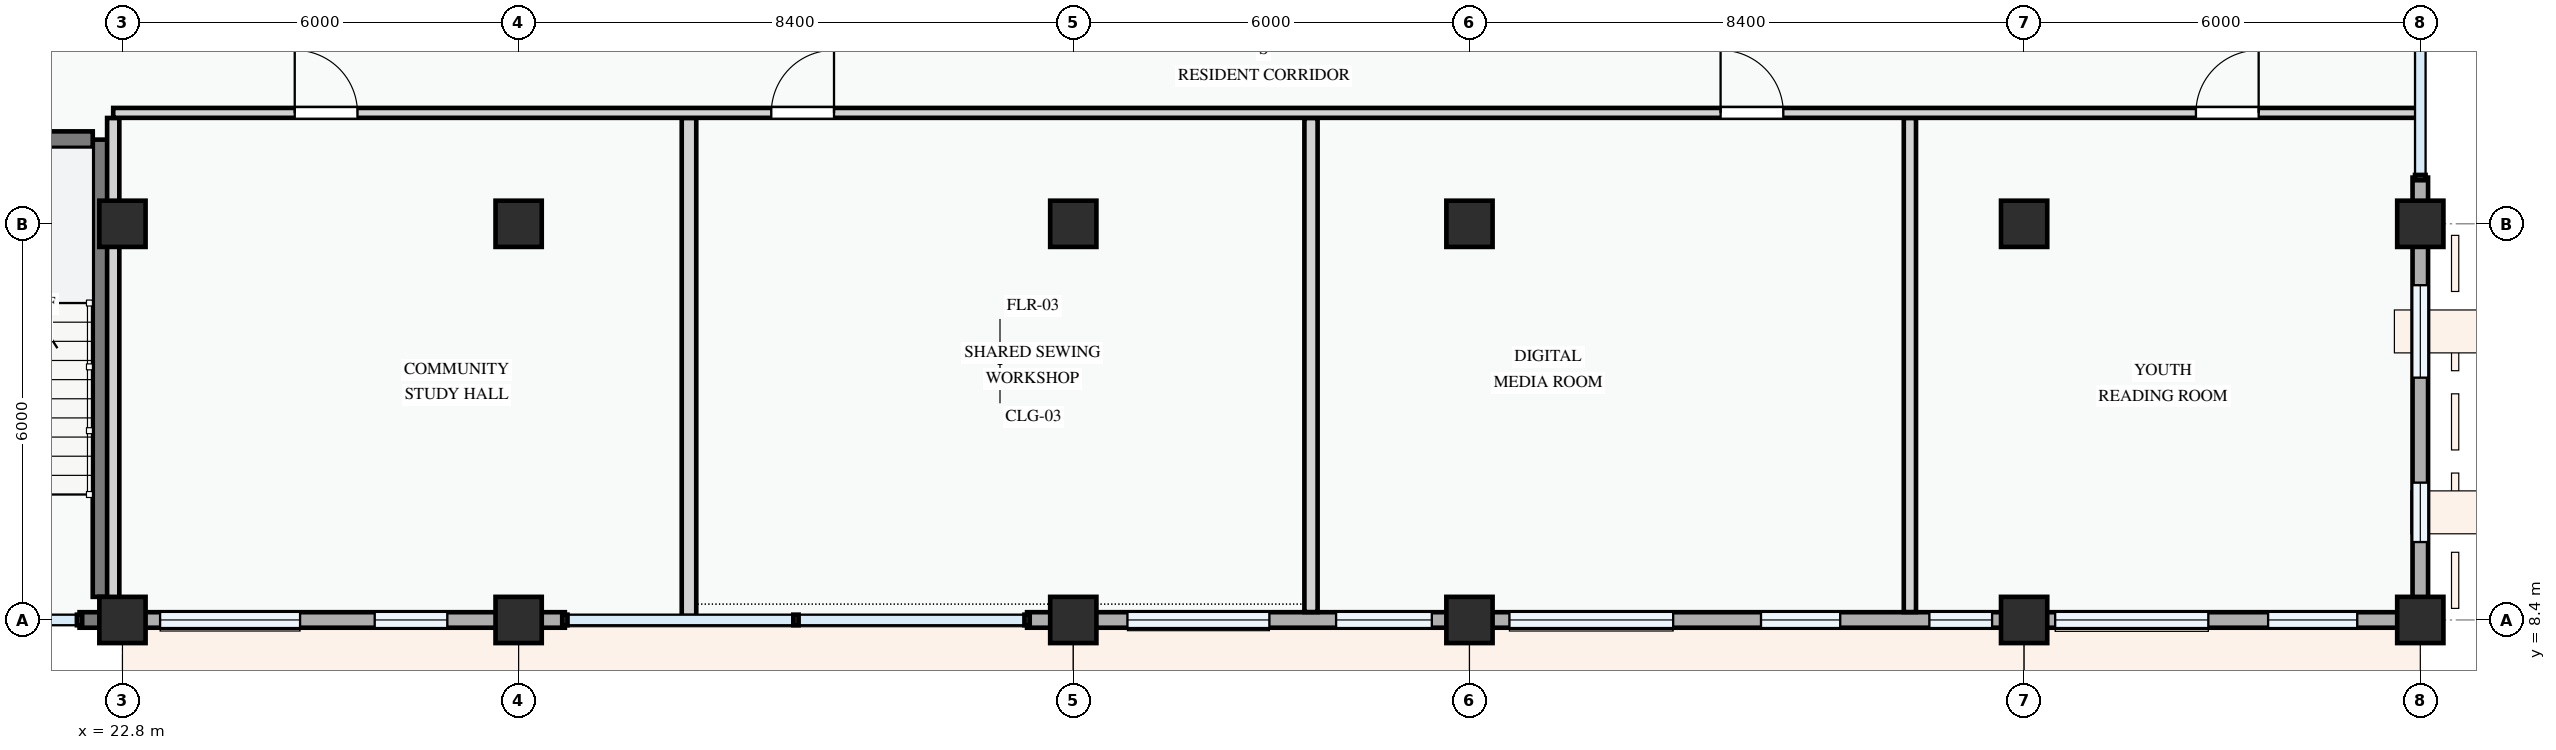
"""IFC4 building model, lengths in metres.
Left out: names, types, materials, properties, quantities, classifications, styles, units other than length and angle.
Written with IfcOpenShell. Run it as: python <this file> out.ifc"""

import sys

from ifc_helpers import new_model, si_unit, direction, frame, frame_2d, origin, origin_2d, place, context, subcontext, project, spatial, rectangle, extrude, element, fill, save


model = new_model("IFC4")
c1 = context("Model", 3, precision=1e-05, world=origin(), true_north=direction((0.0, 1.0)))
c2 = subcontext(c1, "Body", "Model", "MODEL_VIEW")
j1 = project(units=[si_unit("LENGTHUNIT", "METRE"), si_unit("PLANEANGLEUNIT", "RADIAN")], contexts=[c1])
p1 = place(None, origin())
s1 = spatial("IfcSite", under=j1, at=p1, CompositionType="ELEMENT")
p2 = place(p1, origin())
s2 = spatial("IfcBuilding", under=s1, at=p2, CompositionType="ELEMENT")
p3 = place(p2, frame((0.0, 0.0, 4.5)))
s3 = spatial("IfcBuildingStorey", under=s2, at=p3, CompositionType="ELEMENT", Elevation=4.5)
for number, where, z_axis, x_axis in (
    (1, (22.8, 8.4, 0.0), (0.0, 0.0, 1.0), (1.0, 0.0, 0.0)),
    (2, (22.8, 14.4, 0.0), (0.0, 0.0, 1.0), (1.0, 0.0, 0.0)),
    (3, (28.8, 8.4, 0.0), (0.0, 0.0, 1.0), (1.0, 0.0, 0.0)),
    (4, (28.8, 14.4, 0.0), (0.0, 0.0, 1.0), (1.0, 0.0, 0.0)),
    (5, (37.2, 8.4, 0.0), (0.0, 0.0, 1.0), (1.0, 0.0, 0.0)),
    (6, (37.2, 14.4, 0.0), (0.0, 0.0, 1.0), (1.0, 0.0, 0.0)),
    (7, (43.2, 8.4, 0.0), (0.0, 0.0, 1.0), (1.0, 0.0, 0.0)),
    (8, (43.2, 14.4, 0.0), (0.0, 0.0, 1.0), (1.0, 0.0, 0.0)),
    (9, (51.6, 8.4, 0.0), (0.0, 0.0, 1.0), (1.0, 0.0, 0.0)),
    (10, (51.6, 14.4, 0.0), (0.0, 0.0, 1.0), (1.0, 0.0, 0.0)),
    (11, (57.6, 8.4, 0.0), (0.0, 0.0, 1.0), (1.0, 0.0, 0.0)),
    (12, (57.6, 14.4, 0.0), (0.0, 0.0, 1.0), (1.0, 0.0, 0.0)),
):
    element("IfcColumn", number, at=place(p3, frame(where, z_axis=z_axis, x_axis=x_axis)), inside=s3, PredefinedType="COLUMN", context=c2, shape_type="SweptSolid", body=[
        extrude(rectangle(XDim=0.7, YDim=0.7, at=origin_2d()), origin(), (0.0, 0.0, 1.0), 3.6),
    ])
p4 = place(p3, frame((22.15, 8.4, 0.0), z_axis=(0.0, 0.0, 1.0), x_axis=(1.0, 0.0, 0.0)))
e13 = element("IfcWall", 13, at=p4, inside=s3, PredefinedType="STANDARD", context=c2, shape_type="SweptSolid", body=[
    extrude(rectangle(XDim=0.65, YDim=0.235, at=frame_2d((0.325, 0.0))), origin(), (0.0, 0.0, 1.0), 3.34),
])
p5 = place(p3, frame((22.8, 8.4, 0.0), z_axis=(0.0, 0.0, 1.0), x_axis=(1.0, 0.0, 0.0)))
e14 = element("IfcWall", 14, at=p5, inside=s3, PredefinedType="STANDARD", context=c2, shape_type="SweptSolid", body=[
    extrude(rectangle(XDim=6.0, YDim=0.235, at=frame_2d((3.0, 0.0))), origin(), (0.0, 0.0, 1.0), 2.775),
])
p6 = place(p5, frame((0.57, 0.0, 0.78)))
e15 = element("IfcOpeningElement", 15, at=p6, cuts=e14, PredefinedType="OPENING", context=c2, shape_type="SweptSolid", body=[
    extrude(rectangle(XDim=2.12, YDim=1.44, at=frame_2d((1.06, 0.72))), frame((0.0, 0.127, 0.0), z_axis=(0.0, -1.0, 0.0), x_axis=(1.0, 0.0, 0.0)), (0.0, 0.0, 1.0), 0.255),
])
p7 = place(p5, frame((3.82, 0.0, 0.78)))
e16 = element("IfcOpeningElement", 16, at=p7, cuts=e14, PredefinedType="OPENING", context=c2, shape_type="SweptSolid", body=[
    extrude(rectangle(XDim=1.1, YDim=1.3, at=frame_2d((0.55, 0.65))), frame((0.0, 0.127, 0.0), z_axis=(0.0, -1.0, 0.0), x_axis=(1.0, 0.0, 0.0)), (0.0, 0.0, 1.0), 0.255),
])
for number, where, z_axis, x_axis in (
    (17, (28.8, 8.4, 0.0), (0.0, 0.0, 1.0), (1.0, 0.0, 0.0)),
    (18, (36.5, 8.4, 0.0), (0.0, 0.0, 1.0), (1.0, 0.0, 0.0)),
):
    element("IfcWall", number, at=place(p3, frame(where, z_axis=z_axis, x_axis=x_axis)), inside=s3, PredefinedType="STANDARD", context=c2, shape_type="SweptSolid", body=[
        extrude(rectangle(XDim=0.7, YDim=0.235, at=frame_2d((0.35, 0.0))), origin(), (0.0, 0.0, 1.0), 2.675),
    ])
p8 = place(p3, frame((37.2, 8.4, 0.0), z_axis=(0.0, 0.0, 1.0), x_axis=(1.0, 0.0, 0.0)))
e19 = element("IfcWall", 19, at=p8, inside=s3, PredefinedType="STANDARD", context=c2, shape_type="SweptSolid", body=[
    extrude(rectangle(XDim=6.0, YDim=0.235, at=frame_2d((3.0, 0.0))), origin(), (0.0, 0.0, 1.0), 2.775),
])
p9 = place(p8, frame((0.82, 0.0, 0.78)))
e20 = element("IfcOpeningElement", 20, at=p9, cuts=e19, PredefinedType="OPENING", context=c2, shape_type="SweptSolid", body=[
    extrude(rectangle(XDim=2.15, YDim=1.65, at=frame_2d((1.075, 0.825))), frame((0.0, 0.127, 0.0), z_axis=(0.0, -1.0, 0.0), x_axis=(1.0, 0.0, 0.0)), (0.0, 0.0, 1.0), 0.255),
])
p10 = place(p8, frame((3.98, 0.0, 0.78)))
e21 = element("IfcOpeningElement", 21, at=p10, cuts=e19, PredefinedType="OPENING", context=c2, shape_type="SweptSolid", body=[
    extrude(rectangle(XDim=1.45, YDim=1.6, at=frame_2d((0.725, 0.8))), frame((0.0, 0.127, 0.0), z_axis=(0.0, -1.0, 0.0), x_axis=(1.0, 0.0, 0.0)), (0.0, 0.0, 1.0), 0.255),
])
p11 = place(p3, frame((43.2, 8.4, 0.0), z_axis=(0.0, 0.0, 1.0), x_axis=(1.0, 0.0, 0.0)))
e22 = element("IfcWall", 22, at=p11, inside=s3, PredefinedType="STANDARD", context=c2, shape_type="SweptSolid", body=[
    extrude(rectangle(XDim=8.4, YDim=0.235, at=frame_2d((4.2, 0.0))), origin(), (0.0, 0.0, 1.0), 2.675),
])
p12 = place(p11, frame((0.605, 0.0, 0.78)))
e23 = element("IfcOpeningElement", 23, at=p12, cuts=e22, PredefinedType="OPENING", context=c2, shape_type="SweptSolid", body=[
    extrude(rectangle(XDim=2.48, YDim=1.46, at=frame_2d((1.24, 0.73))), frame((0.0, 0.127, 0.0), z_axis=(0.0, -1.0, 0.0), x_axis=(1.0, 0.0, 0.0)), (0.0, 0.0, 1.0), 0.255),
])
p13 = place(p11, frame((4.415, 0.0, 0.78)))
e24 = element("IfcOpeningElement", 24, at=p13, cuts=e22, PredefinedType="OPENING", context=c2, shape_type="SweptSolid", body=[
    extrude(rectangle(XDim=1.2, YDim=1.5, at=frame_2d((0.6, 0.75))), frame((0.0, 0.127, 0.0), z_axis=(0.0, -1.0, 0.0), x_axis=(1.0, 0.0, 0.0)), (0.0, 0.0, 1.0), 0.255),
])
p14 = place(p11, frame((6.965, 0.0, 0.78)))
e25 = element("IfcOpeningElement", 25, at=p14, cuts=e22, PredefinedType="OPENING", context=c2, shape_type="SweptSolid", body=[
    extrude(rectangle(XDim=0.95, YDim=1.15, at=frame_2d((0.475, 0.575))), frame((0.0, 0.127, 0.0), z_axis=(0.0, -1.0, 0.0), x_axis=(1.0, 0.0, 0.0)), (0.0, 0.0, 1.0), 0.255),
])
p15 = place(p3, frame((51.6, 8.4, 0.0), z_axis=(0.0, 0.0, 1.0), x_axis=(1.0, 0.0, 0.0)))
e26 = element("IfcWall", 26, at=p15, inside=s3, PredefinedType="STANDARD", context=c2, shape_type="SweptSolid", body=[
    extrude(rectangle(XDim=6.0, YDim=0.235, at=frame_2d((3.0, 0.0))), origin(), (0.0, 0.0, 1.0), 2.775),
])
p16 = place(p15, frame((0.47, 0.0, 0.78)))
e27 = element("IfcOpeningElement", 27, at=p16, cuts=e26, PredefinedType="OPENING", context=c2, shape_type="SweptSolid", body=[
    extrude(rectangle(XDim=2.32, YDim=1.5, at=frame_2d((1.16, 0.75))), frame((0.0, 0.127, 0.0), z_axis=(0.0, -1.0, 0.0), x_axis=(1.0, 0.0, 0.0)), (0.0, 0.0, 1.0), 0.255),
])
p17 = place(p15, frame((3.695, 0.0, 0.78)))
e28 = element("IfcOpeningElement", 28, at=p17, cuts=e26, PredefinedType="OPENING", context=c2, shape_type="SweptSolid", body=[
    extrude(rectangle(XDim=1.35, YDim=1.55, at=frame_2d((0.675, 0.775))), frame((0.0, 0.127, 0.0), z_axis=(0.0, -1.0, 0.0), x_axis=(1.0, 0.0, 0.0)), (0.0, 0.0, 1.0), 0.255),
])
p18 = place(p3, frame((57.6, 8.4, 0.0), z_axis=(0.0, 0.0, 1.0), x_axis=(0.0, 1.0, 0.0)))
e29 = element("IfcWall", 29, at=p18, inside=s3, PredefinedType="STANDARD", context=c2, shape_type="SweptSolid", body=[
    extrude(rectangle(XDim=6.0, YDim=0.235, at=frame_2d((3.0, 0.0))), origin(), (0.0, 0.0, 1.0), 2.875),
])
p19 = place(p18, frame((1.18, 0.0, 0.78)))
e30 = element("IfcOpeningElement", 30, at=p19, cuts=e29, PredefinedType="OPENING", context=c2, shape_type="SweptSolid", body=[
    extrude(rectangle(XDim=0.9, YDim=1.2, at=frame_2d((0.45, 0.6))), frame((0.0, 0.127, 0.0), z_axis=(0.0, -1.0, 0.0), x_axis=(1.0, 0.0, 0.0)), (0.0, 0.0, 1.0), 0.255),
])
p20 = place(p18, frame((3.67, 0.0, 0.78)))
e31 = element("IfcOpeningElement", 31, at=p20, cuts=e29, PredefinedType="OPENING", context=c2, shape_type="SweptSolid", body=[
    extrude(rectangle(XDim=1.4, YDim=1.45, at=frame_2d((0.7, 0.725))), frame((0.0, 0.127, 0.0), z_axis=(0.0, -1.0, 0.0), x_axis=(1.0, 0.0, 0.0)), (0.0, 0.0, 1.0), 0.255),
])
p21 = place(p3, frame((57.6, 14.4, 0.0), z_axis=(0.0, 0.0, 1.0), x_axis=(0.0, 1.0, 0.0)))
e32 = element("IfcWall", 32, at=p21, inside=s3, PredefinedType="STANDARD", context=c2, shape_type="SweptSolid", body=[
    extrude(rectangle(XDim=0.7, YDim=0.235, at=frame_2d((0.35, 0.0))), origin(), (0.0, 0.0, 1.0), 2.725),
])
p22 = place(p3, frame((22.475, 8.75, 0.0), z_axis=(0.0, 0.0, 1.0), x_axis=(0.0, 1.0, 0.0)))
e33 = element("IfcWall", 33, at=p22, inside=s3, PredefinedType="SHEAR", context=c2, shape_type="SweptSolid", body=[
    extrude(rectangle(XDim=6.925, YDim=0.25, at=frame_2d((3.462, 0.0))), origin(), (0.0, 0.0, 1.0), 3.3),
])
p23 = place(p3, frame((8.85, 15.675, 0.0), z_axis=(0.0, 0.0, 1.0), x_axis=(1.0, 0.0, 0.0)))
e34 = element("IfcWall", 34, at=p23, inside=s3, PredefinedType="SHEAR", context=c2, shape_type="SweptSolid", body=[
    extrude(rectangle(XDim=13.5, YDim=0.25, at=frame_2d((6.75, 0.0))), origin(), (0.0, 0.0, 1.0), 3.3),
])
p24 = place(p23, frame((6.2, 0.0, 0.0)))
e35 = element("IfcOpeningElement", 35, at=p24, cuts=e34, PredefinedType="OPENING", context=c2, shape_type="SweptSolid", body=[
    extrude(rectangle(XDim=1.1, YDim=2.15, at=frame_2d((0.55, 1.075))), frame((0.0, 0.135, 0.0), z_axis=(0.0, -1.0, 0.0), x_axis=(1.0, 0.0, 0.0)), (0.0, 0.0, 1.0), 0.27),
])
p25 = place(p3, frame((22.66, 8.52, 0.0), z_axis=(0.0, 0.0, 1.0), x_axis=(0.0, 1.0, 0.0)))
e36 = element("IfcWall", 36, at=p25, inside=s3, PredefinedType="PARTITIONING", context=c2, shape_type="SweptSolid", body=[
    extrude(rectangle(XDim=7.483, YDim=0.185, at=frame_2d((3.742, 0.0))), origin(), (0.0, 0.0, 1.0), 2.725),
])
p26 = place(p3, frame((31.38, 8.46, 0.0), z_axis=(0.0, 0.0, 1.0), x_axis=(0.0, 1.0, 0.0)))
e37 = element("IfcWall", 37, at=p26, inside=s3, PredefinedType="PARTITIONING", context=c2, shape_type="SweptSolid", body=[
    extrude(rectangle(XDim=7.543, YDim=0.22, at=frame_2d((3.771, 0.0))), origin(), (0.0, 0.0, 1.0), 3.3),
])
p27 = place(p3, frame((40.8, 8.52, 0.0), z_axis=(0.0, 0.0, 1.0), x_axis=(0.0, 1.0, 0.0)))
e38 = element("IfcWall", 38, at=p27, inside=s3, PredefinedType="PARTITIONING", context=c2, shape_type="SweptSolid", body=[
    extrude(rectangle(XDim=7.483, YDim=0.2, at=frame_2d((3.742, 0.0))), origin(), (0.0, 0.0, 1.0), 3.3),
])
p28 = place(p3, frame((49.87, 8.52, 0.0), z_axis=(0.0, 0.0, 1.0), x_axis=(0.0, 1.0, 0.0)))
e39 = element("IfcWall", 39, at=p28, inside=s3, PredefinedType="PARTITIONING", context=c2, shape_type="SweptSolid", body=[
    extrude(rectangle(XDim=7.483, YDim=0.185, at=frame_2d((3.742, 0.0))), origin(), (0.0, 0.0, 1.0), 3.3),
])
p29 = place(p3, frame((22.66, 16.08, 0.0), z_axis=(0.0, 0.0, 1.0), x_axis=(1.0, 0.0, 0.0)))
e40 = element("IfcWall", 40, at=p29, inside=s3, PredefinedType="PARTITIONING", context=c2, shape_type="SweptSolid", body=[
    extrude(rectangle(XDim=34.88, YDim=0.15, at=frame_2d((17.44, 0.0))), origin(), (0.0, 0.0, 1.0), 3.3),
])
p30 = place(p29, frame((2.749, 0.0, 0.0)))
e41 = element("IfcOpeningElement", 41, at=p30, cuts=e40, PredefinedType="OPENING", context=c2, shape_type="SweptSolid", body=[
    extrude(rectangle(XDim=0.95, YDim=2.1, at=frame_2d((0.475, 1.05))), frame((0.0, 0.085, 0.0), z_axis=(0.0, -1.0, 0.0), x_axis=(1.0, 0.0, 0.0)), (0.0, 0.0, 1.0), 0.17),
])
p31 = place(p29, frame((9.966, 0.0, 0.0)))
e42 = element("IfcOpeningElement", 42, at=p31, cuts=e40, PredefinedType="OPENING", context=c2, shape_type="SweptSolid", body=[
    extrude(rectangle(XDim=0.95, YDim=2.1, at=frame_2d((0.475, 1.05))), frame((0.0, 0.085, 0.0), z_axis=(0.0, -1.0, 0.0), x_axis=(1.0, 0.0, 0.0)), (0.0, 0.0, 1.0), 0.17),
])
p32 = place(p29, frame((24.343, 0.0, 0.0)))
e43 = element("IfcOpeningElement", 43, at=p32, cuts=e40, PredefinedType="OPENING", context=c2, shape_type="SweptSolid", body=[
    extrude(rectangle(XDim=0.95, YDim=2.1, at=frame_2d((0.475, 1.05))), frame((0.0, 0.085, 0.0), z_axis=(0.0, -1.0, 0.0), x_axis=(1.0, 0.0, 0.0)), (0.0, 0.0, 1.0), 0.17),
])
p33 = place(p29, frame((31.542, 0.0, 0.0)))
e44 = element("IfcOpeningElement", 44, at=p33, cuts=e40, PredefinedType="OPENING", context=c2, shape_type="SweptSolid", body=[
    extrude(rectangle(XDim=0.95, YDim=2.1, at=frame_2d((0.475, 1.05))), frame((0.0, 0.085, 0.0), z_axis=(0.0, -1.0, 0.0), x_axis=(1.0, 0.0, 0.0)), (0.0, 0.0, 1.0), 0.17),
])
p34 = place(p6, origin())
e45 = element("IfcWindow", 45, at=p34, inside=s3, PartitioningType="DOUBLE_PANEL_VERTICAL", PredefinedType="WINDOW", context=c2, shape_type="SweptSolid", body=[
    extrude(rectangle(XDim=2.12, YDim=1.44, at=frame_2d((1.06, 0.72))), frame((0.0, 0.03, 0.0), z_axis=(0.0, -1.0, 0.0), x_axis=(1.0, 0.0, 0.0)), (0.0, 0.0, 1.0), 0.06),
])
fill(e15, e45)
p35 = place(p7, origin())
e46 = element("IfcWindow", 46, at=p35, inside=s3, PartitioningType="SINGLE_PANEL", PredefinedType="WINDOW", context=c2, shape_type="SweptSolid", body=[
    extrude(rectangle(XDim=1.1, YDim=1.3, at=frame_2d((0.55, 0.65))), frame((0.0, 0.03, 0.0), z_axis=(0.0, -1.0, 0.0), x_axis=(1.0, 0.0, 0.0)), (0.0, 0.0, 1.0), 0.06),
])
fill(e16, e46)
p36 = place(p9, origin())
e47 = element("IfcWindow", 47, at=p36, inside=s3, PartitioningType="DOUBLE_PANEL_VERTICAL", PredefinedType="WINDOW", context=c2, shape_type="SweptSolid", body=[
    extrude(rectangle(XDim=2.15, YDim=1.65, at=frame_2d((1.075, 0.825))), frame((0.0, 0.03, 0.0), z_axis=(0.0, -1.0, 0.0), x_axis=(1.0, 0.0, 0.0)), (0.0, 0.0, 1.0), 0.06),
])
fill(e20, e47)
p37 = place(p10, origin())
e48 = element("IfcWindow", 48, at=p37, inside=s3, PartitioningType="SINGLE_PANEL", PredefinedType="WINDOW", context=c2, shape_type="SweptSolid", body=[
    extrude(rectangle(XDim=1.45, YDim=1.6, at=frame_2d((0.725, 0.8))), frame((0.0, 0.03, 0.0), z_axis=(0.0, -1.0, 0.0), x_axis=(1.0, 0.0, 0.0)), (0.0, 0.0, 1.0), 0.06),
])
fill(e21, e48)
p38 = place(p12, origin())
e49 = element("IfcWindow", 49, at=p38, inside=s3, PartitioningType="DOUBLE_PANEL_VERTICAL", PredefinedType="WINDOW", context=c2, shape_type="SweptSolid", body=[
    extrude(rectangle(XDim=2.48, YDim=1.46, at=frame_2d((1.24, 0.73))), frame((0.0, 0.03, 0.0), z_axis=(0.0, -1.0, 0.0), x_axis=(1.0, 0.0, 0.0)), (0.0, 0.0, 1.0), 0.06),
])
fill(e23, e49)
p39 = place(p13, origin())
e50 = element("IfcWindow", 50, at=p39, inside=s3, PartitioningType="SINGLE_PANEL", PredefinedType="WINDOW", context=c2, shape_type="SweptSolid", body=[
    extrude(rectangle(XDim=1.2, YDim=1.5, at=frame_2d((0.6, 0.75))), frame((0.0, 0.03, 0.0), z_axis=(0.0, -1.0, 0.0), x_axis=(1.0, 0.0, 0.0)), (0.0, 0.0, 1.0), 0.06),
])
fill(e24, e50)
p40 = place(p14, origin())
e51 = element("IfcWindow", 51, at=p40, inside=s3, PartitioningType="SINGLE_PANEL", PredefinedType="WINDOW", context=c2, shape_type="SweptSolid", body=[
    extrude(rectangle(XDim=0.95, YDim=1.15, at=frame_2d((0.475, 0.575))), frame((0.0, 0.03, 0.0), z_axis=(0.0, -1.0, 0.0), x_axis=(1.0, 0.0, 0.0)), (0.0, 0.0, 1.0), 0.06),
])
fill(e25, e51)
p41 = place(p16, origin())
e52 = element("IfcWindow", 52, at=p41, inside=s3, PartitioningType="DOUBLE_PANEL_VERTICAL", PredefinedType="WINDOW", context=c2, shape_type="SweptSolid", body=[
    extrude(rectangle(XDim=2.32, YDim=1.5, at=frame_2d((1.16, 0.75))), frame((0.0, 0.03, 0.0), z_axis=(0.0, -1.0, 0.0), x_axis=(1.0, 0.0, 0.0)), (0.0, 0.0, 1.0), 0.06),
])
fill(e27, e52)
p42 = place(p17, origin())
e53 = element("IfcWindow", 53, at=p42, inside=s3, PartitioningType="SINGLE_PANEL", PredefinedType="WINDOW", context=c2, shape_type="SweptSolid", body=[
    extrude(rectangle(XDim=1.35, YDim=1.55, at=frame_2d((0.675, 0.775))), frame((0.0, 0.03, 0.0), z_axis=(0.0, -1.0, 0.0), x_axis=(1.0, 0.0, 0.0)), (0.0, 0.0, 1.0), 0.06),
])
fill(e28, e53)
p43 = place(p19, origin())
e54 = element("IfcWindow", 54, at=p43, inside=s3, PartitioningType="SINGLE_PANEL", PredefinedType="WINDOW", context=c2, shape_type="SweptSolid", body=[
    extrude(rectangle(XDim=0.9, YDim=1.2, at=frame_2d((0.45, 0.6))), frame((0.0, 0.03, 0.0), z_axis=(0.0, -1.0, 0.0), x_axis=(1.0, 0.0, 0.0)), (0.0, 0.0, 1.0), 0.06),
])
fill(e30, e54)
p44 = place(p20, origin())
e55 = element("IfcWindow", 55, at=p44, inside=s3, PartitioningType="SINGLE_PANEL", PredefinedType="WINDOW", context=c2, shape_type="SweptSolid", body=[
    extrude(rectangle(XDim=1.4, YDim=1.45, at=frame_2d((0.7, 0.725))), frame((0.0, 0.03, 0.0), z_axis=(0.0, -1.0, 0.0), x_axis=(1.0, 0.0, 0.0)), (0.0, 0.0, 1.0), 0.06),
])
fill(e31, e55)
p45 = place(p30, origin())
e56 = element("IfcDoor", 56, at=p45, inside=s3, OperationType="SINGLE_SWING_LEFT", PredefinedType="DOOR", context=c2, shape_type="SweptSolid", body=[
    extrude(rectangle(XDim=0.95, YDim=2.1, at=frame_2d((0.475, 1.05))), frame((0.0, 0.025, 0.0), z_axis=(0.0, -1.0, 0.0), x_axis=(1.0, 0.0, 0.0)), (0.0, 0.0, 1.0), 0.05),
])
fill(e41, e56)
p46 = place(p31, origin())
e57 = element("IfcDoor", 57, at=p46, inside=s3, OperationType="SINGLE_SWING_RIGHT", PredefinedType="DOOR", context=c2, shape_type="SweptSolid", body=[
    extrude(rectangle(XDim=0.95, YDim=2.1, at=frame_2d((0.475, 1.05))), frame((0.0, 0.025, 0.0), z_axis=(0.0, -1.0, 0.0), x_axis=(1.0, 0.0, 0.0)), (0.0, 0.0, 1.0), 0.05),
])
fill(e42, e57)
p47 = place(p32, origin())
e58 = element("IfcDoor", 58, at=p47, inside=s3, OperationType="SINGLE_SWING_LEFT", PredefinedType="DOOR", context=c2, shape_type="SweptSolid", body=[
    extrude(rectangle(XDim=0.95, YDim=2.1, at=frame_2d((0.475, 1.05))), frame((0.0, 0.025, 0.0), z_axis=(0.0, -1.0, 0.0), x_axis=(1.0, 0.0, 0.0)), (0.0, 0.0, 1.0), 0.05),
])
fill(e43, e58)
p48 = place(p33, origin())
e59 = element("IfcDoor", 59, at=p48, inside=s3, OperationType="SINGLE_SWING_RIGHT", PredefinedType="DOOR", context=c2, shape_type="SweptSolid", body=[
    extrude(rectangle(XDim=0.95, YDim=2.1, at=frame_2d((0.475, 1.05))), frame((0.0, 0.025, 0.0), z_axis=(0.0, -1.0, 0.0), x_axis=(1.0, 0.0, 0.0)), (0.0, 0.0, 1.0), 0.05),
])
fill(e44, e59)
save(model, sys.argv[1])
